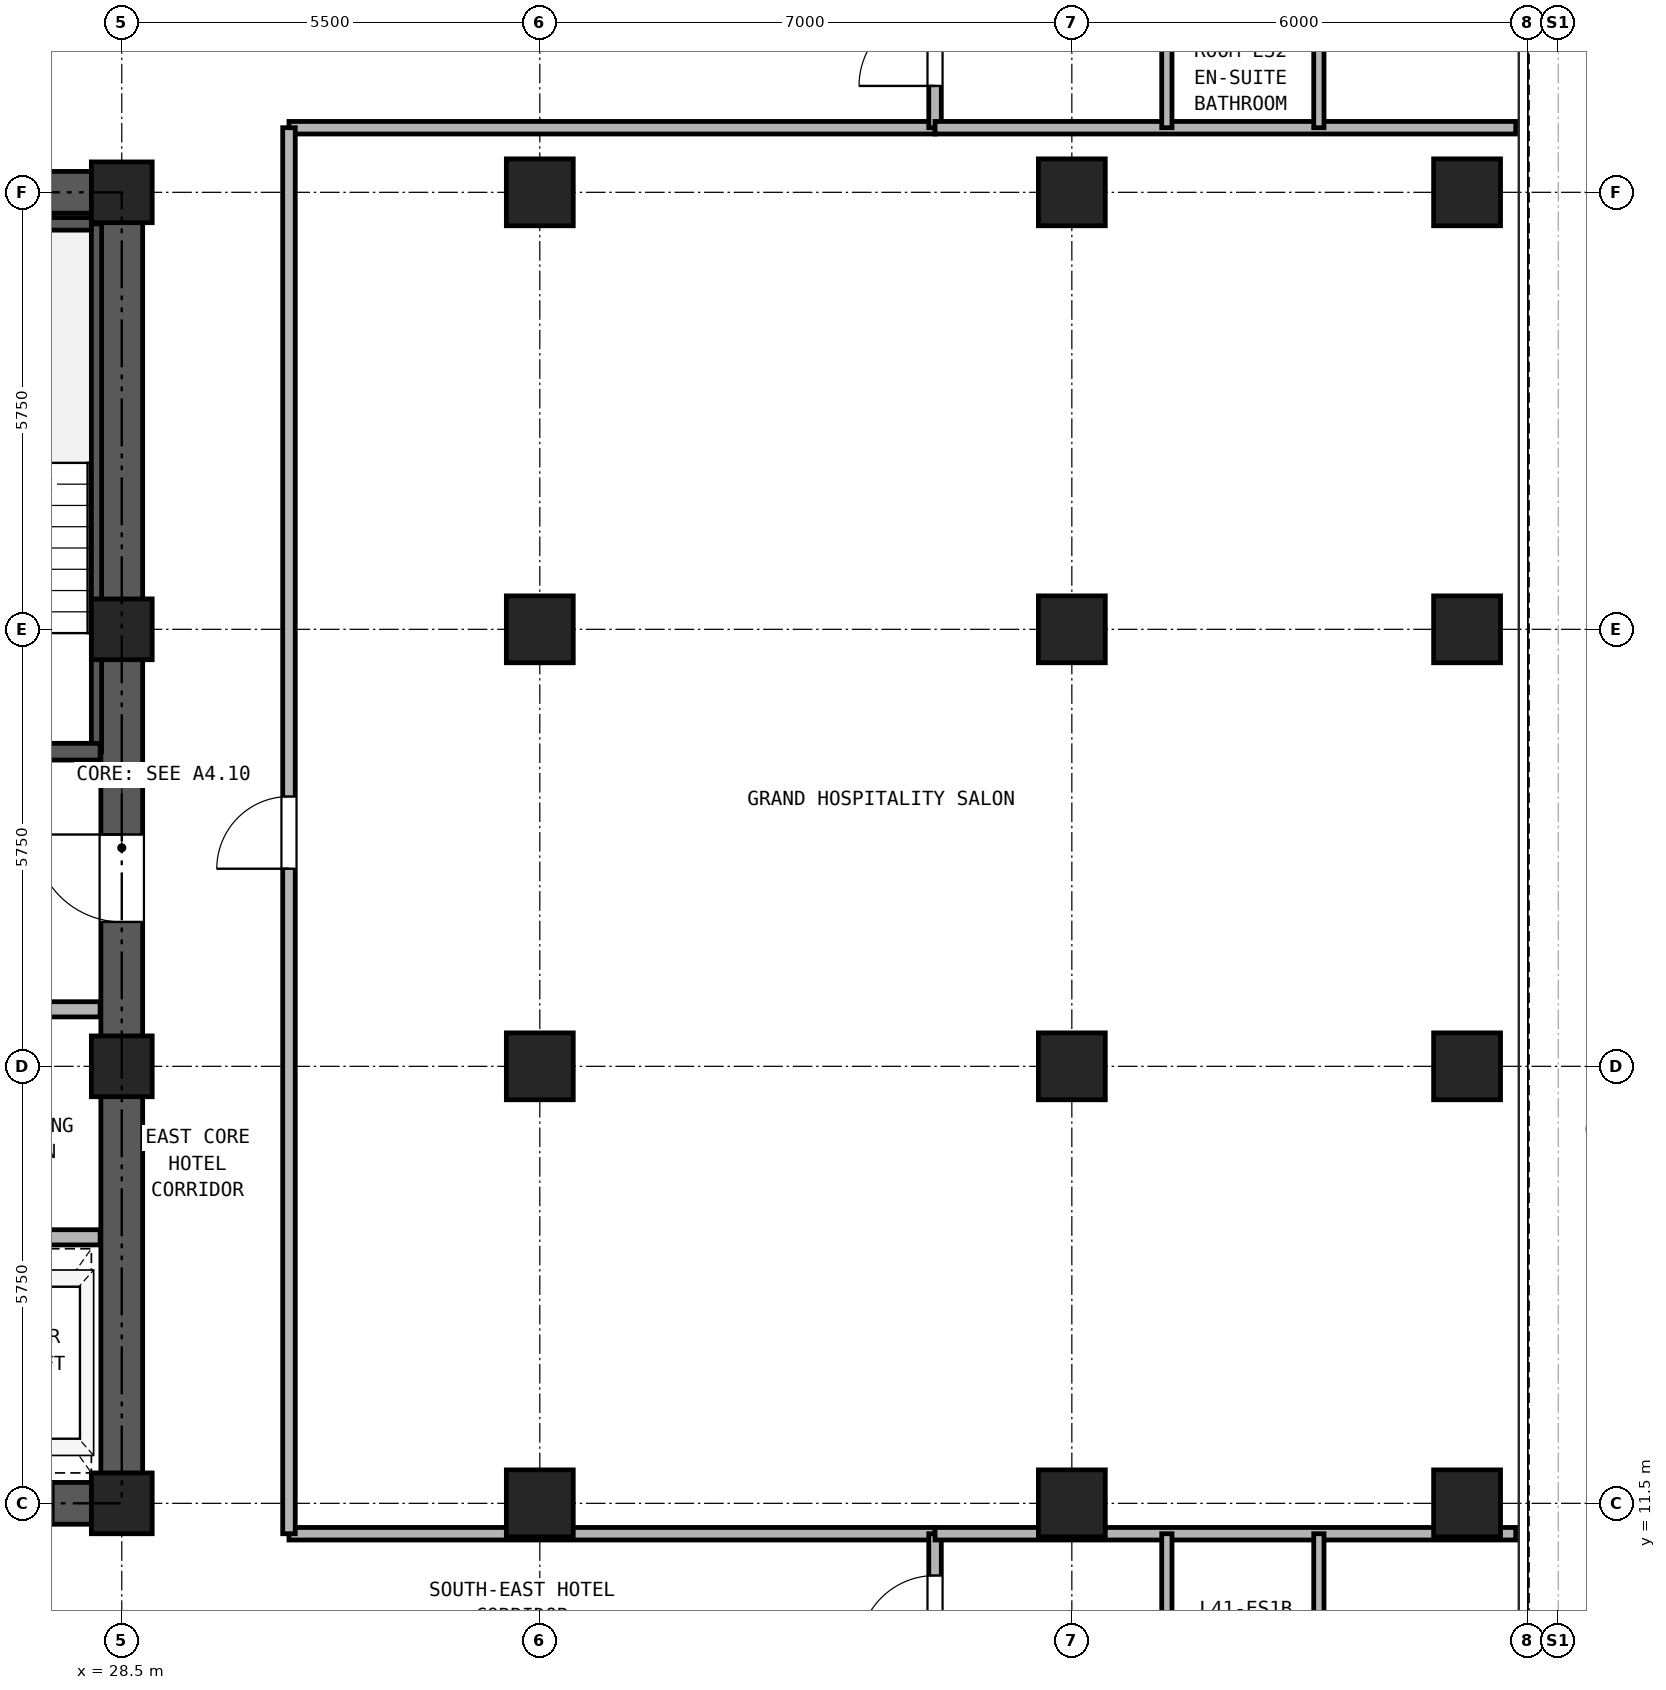
"""IFC4 building model, lengths in metres.
Left out: names, types, materials, properties, quantities, classifications, styles, units other than length and angle.
Written with IfcOpenShell. Run it as: python <this file> out.ifc"""

import sys

from ifc_helpers import new_model, si_unit, direction, frame, frame_2d, origin, origin_2d, place, context, subcontext, project, spatial, rectangle, hollow_rectangle, extrude, source, transform, mapped, element, fill, save


model = new_model("IFC4")
c1 = context("Model", 3, precision=1e-05, world=origin(), true_north=direction((0.0, 1.0)))
c2 = subcontext(c1, "Body", "Model", "MODEL_VIEW")
j1 = project(units=[si_unit("LENGTHUNIT", "METRE"), si_unit("PLANEANGLEUNIT", "RADIAN")], contexts=[c1])
p1 = place(None, origin())
s1 = spatial("IfcSite", under=j1, at=p1, CompositionType="ELEMENT")
p2 = place(p1, origin())
s2 = spatial("IfcBuilding", under=s1, at=p2, CompositionType="ELEMENT")
p3 = place(p2, frame((0.0, 0.0, 148.4)))
s3 = spatial("IfcBuildingStorey", under=s2, at=p3, CompositionType="ELEMENT", Elevation=148.4)
m1 = source(origin(), c2, "Body", "SweptSolid", [
    extrude(hollow_rectangle(XDim=0.88, YDim=0.88, WallThickness=0.05, at=origin_2d()), origin(), (0.0, 0.0, 1.0), 2.84),
])
for number, where, z_axis, x_axis in (
    (1, (46.2, 11.5, 0.0), (0.0, 0.0, 1.0), (1.0, 0.0, 0.0)),
    (2, (46.2, 17.25, 0.0), (0.0, 0.0, 1.0), (1.0, 0.0, 0.0)),
    (3, (46.2, 23.0, 0.0), (0.0, 0.0, 1.0), (1.0, 0.0, 0.0)),
    (4, (46.2, 28.75, 0.0), (0.0, 0.0, 1.0), (1.0, 0.0, 0.0)),
):
    element("IfcColumn", number, at=place(p3, frame(where, z_axis=z_axis, x_axis=x_axis)), inside=s3, PredefinedType="COLUMN", context=c2, shape_type="MappedRepresentation", body=[
        mapped(m1, transform((0.0, 0.0, 0.0), x_axis=(1.0, 0.0, 0.0), y_axis=(0.0, 1.0, 0.0), z_axis=(0.0, 0.0, 1.0), scale=1.0)),
    ])
m2 = source(origin(), c2, "Body", "SweptSolid", [
    extrude(hollow_rectangle(XDim=0.8, YDim=0.8, WallThickness=0.045, at=origin_2d()), origin(), (0.0, 0.0, 1.0), 2.84),
])
for number, where, z_axis, x_axis in (
    (5, (28.5, 11.5, 0.0), (0.0, 0.0, 1.0), (1.0, 0.0, 0.0)),
    (6, (28.5, 17.25, 0.0), (0.0, 0.0, 1.0), (1.0, 0.0, 0.0)),
    (7, (28.5, 23.0, 0.0), (0.0, 0.0, 1.0), (1.0, 0.0, 0.0)),
    (8, (28.5, 28.75, 0.0), (0.0, 0.0, 1.0), (1.0, 0.0, 0.0)),
):
    element("IfcColumn", number, at=place(p3, frame(where, z_axis=z_axis, x_axis=x_axis)), inside=s3, PredefinedType="COLUMN", context=c2, shape_type="MappedRepresentation", body=[
        mapped(m2, transform((0.0, 0.0, 0.0), x_axis=(1.0, 0.0, 0.0), y_axis=(0.0, 1.0, 0.0), z_axis=(0.0, 0.0, 1.0), scale=1.0)),
    ])
for number, where, z_axis, x_axis in (
    (9, (34.0, 11.5, 0.0), (0.0, 0.0, 1.0), (1.0, 0.0, 0.0)),
    (10, (34.0, 17.25, 0.0), (0.0, 0.0, 1.0), (1.0, 0.0, 0.0)),
    (11, (34.0, 23.0, 0.0), (0.0, 0.0, 1.0), (1.0, 0.0, 0.0)),
    (12, (34.0, 28.75, 0.0), (0.0, 0.0, 1.0), (1.0, 0.0, 0.0)),
    (13, (41.0, 11.5, 0.0), (0.0, 0.0, 1.0), (1.0, 0.0, 0.0)),
    (14, (41.0, 17.25, 0.0), (0.0, 0.0, 1.0), (1.0, 0.0, 0.0)),
    (15, (41.0, 23.0, 0.0), (0.0, 0.0, 1.0), (1.0, 0.0, 0.0)),
    (16, (41.0, 28.75, 0.0), (0.0, 0.0, 1.0), (1.0, 0.0, 0.0)),
):
    element("IfcColumn", number, at=place(p3, frame(where, z_axis=z_axis, x_axis=x_axis)), inside=s3, PredefinedType="COLUMN", context=c2, shape_type="MappedRepresentation", body=[
        mapped(m1, transform((0.0, 0.0, 0.0), x_axis=(1.0, 0.0, 0.0), y_axis=(0.0, 1.0, 0.0), z_axis=(0.0, 0.0, 1.0), scale=1.0)),
    ])
p4 = place(p3, frame((18.225, 11.5, 0.0), z_axis=(0.0, 0.0, 1.0), x_axis=(1.0, 0.0, 0.0)))
e17 = element("IfcWall", 17, at=p4, inside=s3, PredefinedType="SHEAR", context=c2, shape_type="SweptSolid", body=[
    extrude(rectangle(XDim=10.55, YDim=0.55, at=frame_2d((5.275, 0.0))), origin(), (0.0, 0.0, 1.0), 2.84),
])
p5 = place(p4, frame((2.375, 0.0, 0.0)))
e18 = element("IfcOpeningElement", 18, at=p5, cuts=e17, PredefinedType="OPENING", context=c2, shape_type="SweptSolid", body=[
    extrude(rectangle(XDim=0.95, YDim=2.15, at=frame_2d((0.475, 1.075))), frame((0.0, 0.285, 0.0), z_axis=(0.0, -1.0, 0.0), x_axis=(1.0, 0.0, 0.0)), (0.0, 0.0, 1.0), 0.57),
])
p6 = place(p4, frame((5.875, 0.0, 0.0)))
e19 = element("IfcOpeningElement", 19, at=p6, cuts=e17, PredefinedType="OPENING", context=c2, shape_type="SweptSolid", body=[
    extrude(rectangle(XDim=1.1, YDim=2.25, at=frame_2d((0.55, 1.125))), frame((0.0, 0.285, 0.0), z_axis=(0.0, -1.0, 0.0), x_axis=(1.0, 0.0, 0.0)), (0.0, 0.0, 1.0), 0.57),
])
p7 = place(p4, frame((8.275, 0.0, 0.0)))
e20 = element("IfcOpeningElement", 20, at=p7, cuts=e17, PredefinedType="OPENING", context=c2, shape_type="SweptSolid", body=[
    extrude(rectangle(XDim=1.1, YDim=2.25, at=frame_2d((0.55, 1.125))), frame((0.0, 0.285, 0.0), z_axis=(0.0, -1.0, 0.0), x_axis=(1.0, 0.0, 0.0)), (0.0, 0.0, 1.0), 0.57),
])
p8 = place(p3, frame((18.225, 28.75, 0.0), z_axis=(0.0, 0.0, 1.0), x_axis=(1.0, 0.0, 0.0)))
e21 = element("IfcWall", 21, at=p8, inside=s3, PredefinedType="SHEAR", context=c2, shape_type="SweptSolid", body=[
    extrude(rectangle(XDim=10.55, YDim=0.55, at=frame_2d((5.275, 0.0))), origin(), (0.0, 0.0, 1.0), 2.84),
])
p9 = place(p8, frame((4.155, 0.0, 0.0)))
e22 = element("IfcOpeningElement", 22, at=p9, cuts=e21, PredefinedType="OPENING", context=c2, shape_type="SweptSolid", body=[
    extrude(rectangle(XDim=0.9, YDim=2.05, at=frame_2d((0.45, 1.025))), frame((0.0, 0.285, 0.0), z_axis=(0.0, -1.0, 0.0), x_axis=(1.0, 0.0, 0.0)), (0.0, 0.0, 1.0), 0.57),
])
p10 = place(p8, frame((5.695, 0.0, 0.0)))
e23 = element("IfcOpeningElement", 23, at=p10, cuts=e21, PredefinedType="OPENING", context=c2, shape_type="SweptSolid", body=[
    extrude(rectangle(XDim=0.9, YDim=2.05, at=frame_2d((0.45, 1.025))), frame((0.0, 0.285, 0.0), z_axis=(0.0, -1.0, 0.0), x_axis=(1.0, 0.0, 0.0)), (0.0, 0.0, 1.0), 0.57),
])
p11 = place(p3, frame((28.5, 11.775, 0.0), z_axis=(0.0, 0.0, 1.0), x_axis=(0.0, 1.0, 0.0)))
e24 = element("IfcWall", 24, at=p11, inside=s3, PredefinedType="SHEAR", context=c2, shape_type="SweptSolid", body=[
    extrude(rectangle(XDim=16.7, YDim=0.55, at=frame_2d((8.35, 0.0))), origin(), (0.0, 0.0, 1.0), 2.84),
])
p12 = place(p11, frame((7.375, 0.0, 0.0)))
e25 = element("IfcOpeningElement", 25, at=p12, cuts=e24, PredefinedType="OPENING", context=c2, shape_type="SweptSolid", body=[
    extrude(rectangle(XDim=1.15, YDim=2.2, at=frame_2d((0.575, 1.1))), frame((0.0, 0.285, 0.0), z_axis=(0.0, -1.0, 0.0), x_axis=(1.0, 0.0, 0.0)), (0.0, 0.0, 1.0), 0.57),
])
p13 = place(p3, frame((25.13, 28.335, 0.0), z_axis=(0.0, 0.0, 1.0), x_axis=(1.0, 0.0, 0.0)))
e26 = element("IfcWall", 26, at=p13, inside=s3, PredefinedType="PARTITIONING", context=c2, shape_type="SweptSolid", body=[
    extrude(rectangle(XDim=3.085, YDim=0.165, at=frame_2d((1.542, 0.0))), origin(), (0.0, 0.0, 1.0), 2.84),
])
p14 = place(p3, frame((28.167, 21.39, 0.0), z_axis=(0.0, 0.0, 1.0), x_axis=(0.0, 1.0, 0.0)))
e27 = element("IfcWall", 27, at=p14, inside=s3, PredefinedType="PARTITIONING", context=c2, shape_type="SweptSolid", body=[
    extrude(rectangle(XDim=6.945, YDim=0.135, at=frame_2d((3.473, 0.0))), origin(), (0.0, 0.0, 1.0), 2.84),
])
p15 = place(p3, frame((25.13, 21.39, 0.0), z_axis=(0.0, 0.0, 1.0), x_axis=(1.0, 0.0, 0.0)))
e28 = element("IfcWall", 28, at=p15, inside=s3, PredefinedType="SOLIDWALL", context=c2, shape_type="SweptSolid", body=[
    extrude(rectangle(XDim=3.085, YDim=0.22, at=frame_2d((1.542, 0.0))), origin(), (0.0, 0.0, 1.0), 2.84),
])
p16 = place(p15, frame((0.92, 0.0, 0.0)))
e29 = element("IfcOpeningElement", 29, at=p16, cuts=e28, PredefinedType="OPENING", context=c2, shape_type="SweptSolid", body=[
    extrude(rectangle(XDim=1.15, YDim=2.2, at=frame_2d((0.575, 1.1))), frame((0.0, 0.12, 0.0), z_axis=(0.0, -1.0, 0.0), x_axis=(1.0, 0.0, 0.0)), (0.0, 0.0, 1.0), 0.24),
])
p17 = place(p3, frame((18.785, 18.0, 0.0), z_axis=(0.0, 0.0, 1.0), x_axis=(1.0, 0.0, 0.0)))
e30 = element("IfcWall", 30, at=p17, inside=s3, PredefinedType="PARTITIONING", context=c2, shape_type="SweptSolid", body=[
    extrude(rectangle(XDim=9.43, YDim=0.2, at=frame_2d((4.715, 0.0))), origin(), (0.0, 0.0, 1.0), 2.84),
])
p18 = place(p17, frame((0.465, 0.0, 0.0)))
e31 = element("IfcOpeningElement", 31, at=p18, cuts=e30, PredefinedType="OPENING", context=c2, shape_type="SweptSolid", body=[
    extrude(rectangle(XDim=1.3, YDim=2.3, at=frame_2d((0.65, 1.15))), frame((0.0, 0.11, 0.0), z_axis=(0.0, -1.0, 0.0), x_axis=(1.0, 0.0, 0.0)), (0.0, 0.0, 1.0), 0.22),
])
p19 = place(p17, frame((2.565, 0.0, 0.0)))
e32 = element("IfcOpeningElement", 32, at=p19, cuts=e30, PredefinedType="OPENING", context=c2, shape_type="SweptSolid", body=[
    extrude(rectangle(XDim=1.3, YDim=2.3, at=frame_2d((0.65, 1.15))), frame((0.0, 0.11, 0.0), z_axis=(0.0, -1.0, 0.0), x_axis=(1.0, 0.0, 0.0)), (0.0, 0.0, 1.0), 0.22),
])
p20 = place(p17, frame((4.965, 0.0, 0.0)))
e33 = element("IfcOpeningElement", 33, at=p20, cuts=e30, PredefinedType="OPENING", context=c2, shape_type="SweptSolid", body=[
    extrude(rectangle(XDim=0.9, YDim=2.05, at=frame_2d((0.45, 1.025))), frame((0.0, 0.11, 0.0), z_axis=(0.0, -1.0, 0.0), x_axis=(1.0, 0.0, 0.0)), (0.0, 0.0, 1.0), 0.22),
])
p21 = place(p17, frame((7.665, 0.0, 0.0)))
e34 = element("IfcOpeningElement", 34, at=p21, cuts=e30, PredefinedType="OPENING", context=c2, shape_type="SweptSolid", body=[
    extrude(rectangle(XDim=0.9, YDim=2.05, at=frame_2d((0.45, 1.025))), frame((0.0, 0.11, 0.0), z_axis=(0.0, -1.0, 0.0), x_axis=(1.0, 0.0, 0.0)), (0.0, 0.0, 1.0), 0.22),
])
p22 = place(p3, frame((18.785, 15.0, 0.0), z_axis=(0.0, 0.0, 1.0), x_axis=(1.0, 0.0, 0.0)))
e35 = element("IfcWall", 35, at=p22, inside=s3, PredefinedType="PARTITIONING", context=c2, shape_type="SweptSolid", body=[
    extrude(rectangle(XDim=9.43, YDim=0.2, at=frame_2d((4.715, 0.0))), origin(), (0.0, 0.0, 1.0), 2.84),
])
for number, where, z_axis, x_axis in (
    (36, (30.7, 11.1, 0.0), (0.0, 0.0, 1.0), (1.0, 0.0, 0.0)),
    (37, (30.7, 29.6, 0.0), (0.0, 0.0, 1.0), (1.0, 0.0, 0.0)),
):
    element("IfcWall", number, at=place(p3, frame(where, z_axis=z_axis, x_axis=x_axis)), inside=s3, PredefinedType="PARTITIONING", context=c2, shape_type="SweptSolid", body=[
        extrude(rectangle(XDim=8.5, YDim=0.165, at=frame_2d((4.25, 0.0))), origin(), (0.0, 0.0, 1.0), 2.84),
    ])
p23 = place(p3, frame((30.7, 11.1, 0.0), z_axis=(0.0, 0.0, 1.0), x_axis=(0.0, 1.0, 0.0)))
e38 = element("IfcWall", 38, at=p23, inside=s3, PredefinedType="PARTITIONING", context=c2, shape_type="SweptSolid", body=[
    extrude(rectangle(XDim=18.5, YDim=0.165, at=frame_2d((9.25, 0.0))), origin(), (0.0, 0.0, 1.0), 2.84),
])
p24 = place(p23, frame((8.75, 0.0, 0.0)))
e39 = element("IfcOpeningElement", 39, at=p24, cuts=e38, PredefinedType="OPENING", context=c2, shape_type="SweptSolid", body=[
    extrude(rectangle(XDim=0.95, YDim=2.15, at=frame_2d((0.475, 1.075))), frame((0.0, 0.093, 0.0), z_axis=(0.0, -1.0, 0.0), x_axis=(1.0, 0.0, 0.0)), (0.0, 0.0, 1.0), 0.185),
])
p25 = place(p3, frame((39.2, 0.16, 0.0), z_axis=(0.0, 0.0, 1.0), x_axis=(0.0, 1.0, 0.0)))
e40 = element("IfcWall", 40, at=p25, inside=s3, PredefinedType="PARTITIONING", context=c2, shape_type="SweptSolid", body=[
    extrude(rectangle(XDim=10.94, YDim=0.165, at=frame_2d((5.47, 0.0))), origin(), (0.0, 0.0, 1.0), 2.84),
])
p26 = place(p25, frame((9.39, 0.0, 0.0)))
e41 = element("IfcOpeningElement", 41, at=p26, cuts=e40, PredefinedType="OPENING", context=c2, shape_type="SweptSolid", body=[
    extrude(rectangle(XDim=1.0, YDim=2.15, at=frame_2d((0.5, 1.075))), frame((0.0, 0.093, 0.0), z_axis=(0.0, -1.0, 0.0), x_axis=(1.0, 0.0, 0.0)), (0.0, 0.0, 1.0), 0.185),
])
p27 = place(p3, frame((39.2, 29.6, 0.0), z_axis=(0.0, 0.0, 1.0), x_axis=(0.0, 1.0, 0.0)))
e42 = element("IfcWall", 42, at=p27, inside=s3, PredefinedType="PARTITIONING", context=c2, shape_type="SweptSolid", body=[
    extrude(rectangle(XDim=5.54, YDim=0.165, at=frame_2d((2.77, 0.0))), origin(), (0.0, 0.0, 1.0), 2.84),
])
p28 = place(p27, frame((0.55, 0.0, 0.0)))
e43 = element("IfcOpeningElement", 43, at=p28, cuts=e42, PredefinedType="OPENING", context=c2, shape_type="SweptSolid", body=[
    extrude(rectangle(XDim=1.0, YDim=2.15, at=frame_2d((0.5, 1.075))), frame((0.0, 0.093, 0.0), z_axis=(0.0, -1.0, 0.0), x_axis=(1.0, 0.0, 0.0)), (0.0, 0.0, 1.0), 0.185),
])
for number, where, z_axis, x_axis in (
    (44, (39.2, 11.1, 0.0), (0.0, 0.0, 1.0), (1.0, 0.0, 0.0)),
    (45, (39.2, 29.6, 0.0), (0.0, 0.0, 1.0), (1.0, 0.0, 0.0)),
):
    element("IfcWall", number, at=place(p3, frame(where, z_axis=z_axis, x_axis=x_axis)), inside=s3, PredefinedType="PARTITIONING", context=c2, shape_type="SweptSolid", body=[
        extrude(rectangle(XDim=7.64, YDim=0.165, at=frame_2d((3.82, 0.0))), origin(), (0.0, 0.0, 1.0), 2.84),
    ])
for number, where, z_axis, x_axis in (
    (46, (42.25, 9.0, 0.0), (0.0, 0.0, 1.0), (0.0, 1.0, 0.0)),
    (47, (44.25, 9.0, 0.0), (0.0, 0.0, 1.0), (0.0, 1.0, 0.0)),
):
    element("IfcWall", number, at=place(p3, frame(where, z_axis=z_axis, x_axis=x_axis)), inside=s3, PredefinedType="PARTITIONING", context=c2, shape_type="SweptSolid", body=[
        extrude(rectangle(XDim=2.1, YDim=0.135, at=frame_2d((1.05, 0.0))), origin(), (0.0, 0.0, 1.0), 2.84),
    ])
for number, where, z_axis, x_axis in (
    (48, (42.25, 29.6, 0.0), (0.0, 0.0, 1.0), (0.0, 1.0, 0.0)),
    (49, (44.25, 29.6, 0.0), (0.0, 0.0, 1.0), (0.0, 1.0, 0.0)),
):
    element("IfcWall", number, at=place(p3, frame(where, z_axis=z_axis, x_axis=x_axis)), inside=s3, PredefinedType="PARTITIONING", context=c2, shape_type="SweptSolid", body=[
        extrude(rectangle(XDim=2.1, YDim=0.135, at=frame_2d((1.05, 0.0))), origin(), (0.0, 0.0, 1.0), 2.84),
    ])
p29 = place(p12, origin())
e50 = element("IfcDoor", 50, at=p29, inside=s3, OperationType="SINGLE_SWING_RIGHT", PredefinedType="DOOR", context=c2, shape_type="SweptSolid", body=[
    extrude(rectangle(XDim=1.15, YDim=2.2, at=frame_2d((0.575, 1.1))), frame((0.0, 0.025, 0.0), z_axis=(0.0, -1.0, 0.0), x_axis=(1.0, 0.0, 0.0)), (0.0, 0.0, 1.0), 0.05),
])
fill(e25, e50)
p30 = place(p7, frame((1.1, 0.0, 0.0), z_axis=(0.0, 0.0, 1.0), x_axis=(-1.0, 0.0, 0.0)))
e51 = element("IfcDoor", 51, at=p30, inside=s3, OperationType="DOUBLE_DOOR_SLIDING", PredefinedType="DOOR", context=c2, shape_type="SweptSolid", body=[
    extrude(rectangle(XDim=1.1, YDim=2.25, at=frame_2d((0.55, 1.125))), frame((0.0, 0.025, 0.0), z_axis=(0.0, -1.0, 0.0), x_axis=(1.0, 0.0, 0.0)), (0.0, 0.0, 1.0), 0.05),
])
fill(e20, e51)
p31 = place(p26, frame((1.0, 0.0, 0.0), z_axis=(0.0, 0.0, 1.0), x_axis=(-1.0, 0.0, 0.0)))
e52 = element("IfcDoor", 52, at=p31, inside=s3, OperationType="SINGLE_SWING_LEFT", PredefinedType="DOOR", context=c2, shape_type="SweptSolid", body=[
    extrude(rectangle(XDim=1.0, YDim=2.15, at=frame_2d((0.5, 1.075))), frame((0.0, 0.025, 0.0), z_axis=(0.0, -1.0, 0.0), x_axis=(1.0, 0.0, 0.0)), (0.0, 0.0, 1.0), 0.05),
])
fill(e41, e52)
p32 = place(p28, frame((1.0, 0.0, 0.0), z_axis=(0.0, 0.0, 1.0), x_axis=(-1.0, 0.0, 0.0)))
e53 = element("IfcDoor", 53, at=p32, inside=s3, OperationType="SINGLE_SWING_LEFT", PredefinedType="DOOR", context=c2, shape_type="SweptSolid", body=[
    extrude(rectangle(XDim=1.0, YDim=2.15, at=frame_2d((0.5, 1.075))), frame((0.0, 0.025, 0.0), z_axis=(0.0, -1.0, 0.0), x_axis=(1.0, 0.0, 0.0)), (0.0, 0.0, 1.0), 0.05),
])
fill(e43, e53)
p33 = place(p24, origin())
e54 = element("IfcDoor", 54, at=p33, inside=s3, OperationType="SINGLE_SWING_LEFT", PredefinedType="DOOR", context=c2, shape_type="SweptSolid", body=[
    extrude(rectangle(XDim=0.95, YDim=2.15, at=frame_2d((0.475, 1.075))), frame((0.0, 0.025, 0.0), z_axis=(0.0, -1.0, 0.0), x_axis=(1.0, 0.0, 0.0)), (0.0, 0.0, 1.0), 0.05),
])
fill(e39, e54)
save(model, sys.argv[1])
